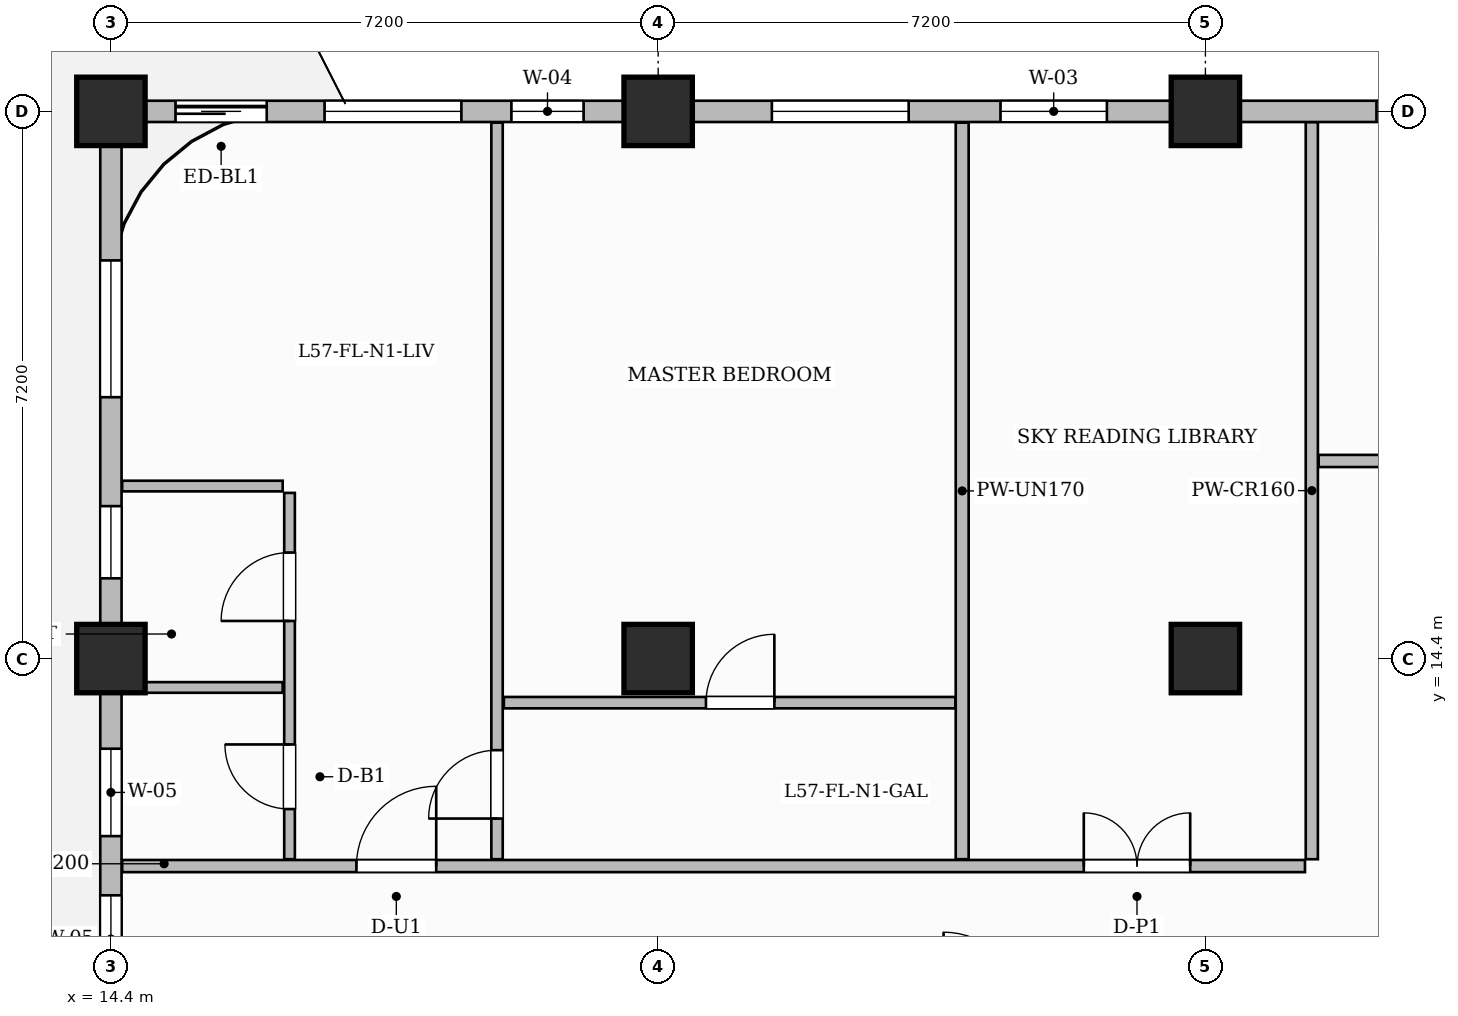
"""IFC4 building model, lengths in metres.
Left out: names, types, materials, properties, quantities, classifications, styles, units other than length and angle.
Written with IfcOpenShell. Run it as: python <this file> out.ifc"""

import sys

from ifc_helpers import new_model, si_unit, direction, frame, frame_2d, origin, origin_2d, place, context, subcontext, project, spatial, rectangle, extrude, source, transform, mapped, element, fill, save


model = new_model("IFC4")
c1 = context("Model", 3, precision=1e-05, world=origin(), true_north=direction((0.0, 1.0)))
c2 = subcontext(c1, "Body", "Model", "MODEL_VIEW")
j1 = project(units=[si_unit("LENGTHUNIT", "METRE"), si_unit("PLANEANGLEUNIT", "RADIAN")], contexts=[c1])
p1 = place(None, origin())
s1 = spatial("IfcSite", under=j1, at=p1, CompositionType="ELEMENT")
p2 = place(p1, origin())
s2 = spatial("IfcBuilding", under=s1, at=p2, CompositionType="ELEMENT")
p3 = place(p2, frame((0.0, 0.0, 228.85)))
s3 = spatial("IfcBuildingStorey", under=s2, at=p3, CompositionType="ELEMENT", Elevation=228.85)
m1 = source(origin(), c2, "Body", "SweptSolid", [
    extrude(rectangle(XDim=0.9, YDim=0.9, at=origin_2d()), origin(), (0.0, 0.0, 1.0), 3.85),
])
for number, where, z_axis, x_axis in (
    (1, (14.4, 14.4, 0.0), (0.0, 0.0, 1.0), (1.0, 0.0, 0.0)),
    (2, (14.4, 21.6, 0.0), (0.0, 0.0, 1.0), (1.0, 0.0, 0.0)),
    (3, (21.6, 14.4, 0.0), (0.0, 0.0, 1.0), (1.0, 0.0, 0.0)),
    (4, (21.6, 21.6, 0.0), (0.0, 0.0, 1.0), (1.0, 0.0, 0.0)),
    (5, (28.8, 14.4, 0.0), (0.0, 0.0, 1.0), (1.0, 0.0, 0.0)),
    (6, (28.8, 21.6, 0.0), (0.0, 0.0, 1.0), (1.0, 0.0, 0.0)),
):
    element("IfcColumn", number, at=place(p3, frame(where, z_axis=z_axis, x_axis=x_axis)), inside=s3, PredefinedType="COLUMN", context=c2, shape_type="MappedRepresentation", body=[
        mapped(m1, transform((0.0, 0.0, 0.0), scale=1.0)),
    ])
p4 = place(p3, frame((14.548, 11.67, 0.0), z_axis=(0.0, 0.0, 1.0), x_axis=(1.0, 0.0, 0.0)))
e7 = element("IfcWall", 7, at=p4, inside=s3, PredefinedType="PARTITIONING", context=c2, shape_type="SweptSolid", body=[
    extrude(rectangle(XDim=15.562, YDim=0.16, at=frame_2d((7.781, 0.0))), origin(), (0.0, 0.0, 1.0), 3.6),
])
p5 = place(p4, frame((3.082, 0.0, 0.0)))
e8 = element("IfcOpeningElement", 8, at=p5, cuts=e7, PredefinedType="OPENING", context=c2, shape_type="SweptSolid", body=[
    extrude(rectangle(XDim=1.05, YDim=2.25, at=frame_2d((0.525, 1.125))), frame((0.0, 0.09, 0.0), z_axis=(0.0, -1.0, 0.0), x_axis=(1.0, 0.0, 0.0)), (0.0, 0.0, 1.0), 0.18),
])
p6 = place(p4, frame((12.652, 0.0, 0.0)))
e9 = element("IfcOpeningElement", 9, at=p6, cuts=e7, PredefinedType="OPENING", context=c2, shape_type="SweptSolid", body=[
    extrude(rectangle(XDim=1.4, YDim=2.35, at=frame_2d((0.7, 1.175))), frame((0.0, 0.09, 0.0), z_axis=(0.0, -1.0, 0.0), x_axis=(1.0, 0.0, 0.0)), (0.0, 0.0, 1.0), 0.18),
])
p7 = place(p3, frame((30.2, 11.76, 0.0), z_axis=(0.0, 0.0, 1.0), x_axis=(0.0, 1.0, 0.0)))
e10 = element("IfcWall", 10, at=p7, inside=s3, PredefinedType="PARTITIONING", context=c2, shape_type="SweptSolid", body=[
    extrude(rectangle(XDim=9.7, YDim=0.16, at=frame_2d((4.85, 0.0))), origin(), (0.0, 0.0, 1.0), 3.6),
])
p8 = place(p3, frame((30.29, 17.0, 0.0), z_axis=(0.0, 0.0, 1.0), x_axis=(1.0, 0.0, 0.0)))
e11 = element("IfcWall", 11, at=p8, inside=s3, PredefinedType="PARTITIONING", context=c2, shape_type="SweptSolid", body=[
    extrude(rectangle(XDim=19.37, YDim=0.16, at=frame_2d((9.685, 0.0))), origin(), (0.0, 0.0, 1.0), 3.6),
])
p9 = place(p8, frame((1.235, 0.0, 0.0)))
e12 = element("IfcOpeningElement", 12, at=p9, cuts=e11, PredefinedType="OPENING", context=c2, shape_type="SweptSolid", body=[
    extrude(rectangle(XDim=0.85, YDim=2.1, at=frame_2d((0.425, 1.05))), frame((0.0, 0.09, 0.0), z_axis=(0.0, -1.0, 0.0), x_axis=(1.0, 0.0, 0.0)), (0.0, 0.0, 1.0), 0.18),
])
p10 = place(p8, frame((7.56, 0.0, 0.0)))
e13 = element("IfcOpeningElement", 13, at=p10, cuts=e11, PredefinedType="OPENING", context=c2, shape_type="SweptSolid", body=[
    extrude(rectangle(XDim=1.4, YDim=2.35, at=frame_2d((0.7, 1.175))), frame((0.0, 0.09, 0.0), z_axis=(0.0, -1.0, 0.0), x_axis=(1.0, 0.0, 0.0)), (0.0, 0.0, 1.0), 0.18),
])
p11 = place(p8, frame((15.785, 0.0, 0.0)))
e14 = element("IfcOpeningElement", 14, at=p11, cuts=e11, PredefinedType="OPENING", context=c2, shape_type="SweptSolid", body=[
    extrude(rectangle(XDim=0.95, YDim=2.15, at=frame_2d((0.475, 1.075))), frame((0.0, 0.09, 0.0), z_axis=(0.0, -1.0, 0.0), x_axis=(1.0, 0.0, 0.0)), (0.0, 0.0, 1.0), 0.18),
])
p12 = place(p3, frame((25.6, 11.76, 0.0), z_axis=(0.0, 0.0, 1.0), x_axis=(0.0, 1.0, 0.0)))
e15 = element("IfcWall", 15, at=p12, inside=s3, PredefinedType="PARTITIONING", context=c2, shape_type="SweptSolid", body=[
    extrude(rectangle(XDim=9.692, YDim=0.17, at=frame_2d((4.846, 0.0))), origin(), (0.0, 0.0, 1.0), 3.6),
])
p13 = place(p3, frame((16.75, 11.76, 0.0), z_axis=(0.0, 0.0, 1.0), x_axis=(0.0, 1.0, 0.0)))
e16 = element("IfcWall", 16, at=p13, inside=s3, PredefinedType="PARTITIONING", context=c2, shape_type="SweptSolid", body=[
    extrude(rectangle(XDim=4.82, YDim=0.14, at=frame_2d((2.41, 0.0))), origin(), (0.0, 0.0, 1.0), 3.6),
])
p14 = place(p13, frame((0.66, 0.0, 0.0)))
e17 = element("IfcOpeningElement", 17, at=p14, cuts=e16, PredefinedType="OPENING", context=c2, shape_type="SweptSolid", body=[
    extrude(rectangle(XDim=0.85, YDim=2.1, at=frame_2d((0.425, 1.05))), frame((0.0, 0.08, 0.0), z_axis=(0.0, -1.0, 0.0), x_axis=(1.0, 0.0, 0.0)), (0.0, 0.0, 1.0), 0.16),
])
p15 = place(p13, frame((3.135, 0.0, 0.0)))
e18 = element("IfcOpeningElement", 18, at=p15, cuts=e16, PredefinedType="OPENING", context=c2, shape_type="SweptSolid", body=[
    extrude(rectangle(XDim=0.9, YDim=2.15, at=frame_2d((0.45, 1.075))), frame((0.0, 0.08, 0.0), z_axis=(0.0, -1.0, 0.0), x_axis=(1.0, 0.0, 0.0)), (0.0, 0.0, 1.0), 0.16),
])
p16 = place(p3, frame((14.59, 14.02, 0.0), z_axis=(0.0, 0.0, 1.0), x_axis=(1.0, 0.0, 0.0)))
e19 = element("IfcWall", 19, at=p16, inside=s3, PredefinedType="PARTITIONING", context=c2, shape_type="SweptSolid", body=[
    extrude(rectangle(XDim=2.07, YDim=0.14, at=frame_2d((1.035, 0.0))), origin(), (0.0, 0.0, 1.0), 3.6),
])
p17 = place(p3, frame((14.548, 16.67, 0.0), z_axis=(0.0, 0.0, 1.0), x_axis=(1.0, 0.0, 0.0)))
e20 = element("IfcWall", 20, at=p17, inside=s3, PredefinedType="PARTITIONING", context=c2, shape_type="SweptSolid", body=[
    extrude(rectangle(XDim=2.112, YDim=0.14, at=frame_2d((1.056, 0.0))), origin(), (0.0, 0.0, 1.0), 3.6),
])
p18 = place(p3, frame((19.48, 11.76, 0.0), z_axis=(0.0, 0.0, 1.0), x_axis=(0.0, 1.0, 0.0)))
e21 = element("IfcWall", 21, at=p18, inside=s3, PredefinedType="PARTITIONING", context=c2, shape_type="SweptSolid", body=[
    extrude(rectangle(XDim=9.692, YDim=0.15, at=frame_2d((4.846, 0.0))), origin(), (0.0, 0.0, 1.0), 3.6),
])
p19 = place(p18, frame((0.535, 0.0, 0.0)))
e22 = element("IfcOpeningElement", 22, at=p19, cuts=e21, PredefinedType="OPENING", context=c2, shape_type="SweptSolid", body=[
    extrude(rectangle(XDim=0.9, YDim=2.15, at=frame_2d((0.45, 1.075))), frame((0.0, 0.085, 0.0), z_axis=(0.0, -1.0, 0.0), x_axis=(1.0, 0.0, 0.0)), (0.0, 0.0, 1.0), 0.17),
])
p20 = place(p3, frame((19.57, 13.82, 0.0), z_axis=(0.0, 0.0, 1.0), x_axis=(1.0, 0.0, 0.0)))
e23 = element("IfcWall", 23, at=p20, inside=s3, PredefinedType="PARTITIONING", context=c2, shape_type="SweptSolid", body=[
    extrude(rectangle(XDim=5.94, YDim=0.15, at=frame_2d((2.97, 0.0))), origin(), (0.0, 0.0, 1.0), 3.6),
])
p21 = place(p20, frame((2.659, 0.0, 0.0)))
e24 = element("IfcOpeningElement", 24, at=p21, cuts=e23, PredefinedType="OPENING", context=c2, shape_type="SweptSolid", body=[
    extrude(rectangle(XDim=0.9, YDim=2.15, at=frame_2d((0.45, 1.075))), frame((0.0, 0.085, 0.0), z_axis=(0.0, -1.0, 0.0), x_axis=(1.0, 0.0, 0.0)), (0.0, 0.0, 1.0), 0.17),
])
p22 = place(p3, frame((14.4, 21.6, 0.0), z_axis=(0.0, 0.0, 1.0), x_axis=(1.0, 0.0, 0.0)))
e25 = element("IfcWall", 25, at=p22, inside=s3, PredefinedType="SOLIDWALL", context=c2, shape_type="SweptSolid", body=[
    extrude(rectangle(XDim=35.4, YDim=0.28, at=frame_2d((17.7, 0.0))), origin(), (0.0, 0.0, 1.0), 3.135),
])
p23 = place(p22, frame((0.85, 0.0, 0.0)))
e26 = element("IfcOpeningElement", 26, at=p23, cuts=e25, PredefinedType="OPENING", context=c2, shape_type="SweptSolid", body=[
    extrude(rectangle(XDim=1.2, YDim=2.2, at=frame_2d((0.6, 1.1))), frame((0.0, 0.15, 0.0), z_axis=(0.0, -1.0, 0.0), x_axis=(1.0, 0.0, 0.0)), (0.0, 0.0, 1.0), 0.3),
])
p24 = place(p22, frame((2.811, 0.0, 0.8)))
e27 = element("IfcOpeningElement", 27, at=p24, cuts=e25, PredefinedType="OPENING", context=c2, shape_type="SweptSolid", body=[
    extrude(rectangle(XDim=1.8, YDim=1.85, at=frame_2d((0.9, 0.925))), frame((0.0, 0.15, 0.0), z_axis=(0.0, -1.0, 0.0), x_axis=(1.0, 0.0, 0.0)), (0.0, 0.0, 1.0), 0.3),
])
p25 = place(p22, frame((5.269, 0.0, 0.8)))
e28 = element("IfcOpeningElement", 28, at=p25, cuts=e25, PredefinedType="OPENING", context=c2, shape_type="SweptSolid", body=[
    extrude(rectangle(XDim=0.95, YDim=1.75, at=frame_2d((0.475, 0.875))), frame((0.0, 0.15, 0.0), z_axis=(0.0, -1.0, 0.0), x_axis=(1.0, 0.0, 0.0)), (0.0, 0.0, 1.0), 0.3),
])
p26 = place(p22, frame((8.696, 0.0, 0.8)))
e29 = element("IfcOpeningElement", 29, at=p26, cuts=e25, PredefinedType="OPENING", context=c2, shape_type="SweptSolid", body=[
    extrude(rectangle(XDim=1.8, YDim=1.85, at=frame_2d((0.9, 0.925))), frame((0.0, 0.15, 0.0), z_axis=(0.0, -1.0, 0.0), x_axis=(1.0, 0.0, 0.0)), (0.0, 0.0, 1.0), 0.3),
])
p27 = place(p22, frame((11.704, 0.0, 0.8)))
e30 = element("IfcOpeningElement", 30, at=p27, cuts=e25, PredefinedType="OPENING", context=c2, shape_type="SweptSolid", body=[
    extrude(rectangle(XDim=1.4, YDim=1.85, at=frame_2d((0.7, 0.925))), frame((0.0, 0.15, 0.0), z_axis=(0.0, -1.0, 0.0), x_axis=(1.0, 0.0, 0.0)), (0.0, 0.0, 1.0), 0.3),
])
p28 = place(p22, frame((16.651, 0.0, 0.8)))
e31 = element("IfcOpeningElement", 31, at=p28, cuts=e25, PredefinedType="OPENING", context=c2, shape_type="SweptSolid", body=[
    extrude(rectangle(XDim=1.8, YDim=1.85, at=frame_2d((0.9, 0.925))), frame((0.0, 0.15, 0.0), z_axis=(0.0, -1.0, 0.0), x_axis=(1.0, 0.0, 0.0)), (0.0, 0.0, 1.0), 0.3),
])
p29 = place(p22, frame((21.725, 0.0, 0.8)))
e32 = element("IfcOpeningElement", 32, at=p29, cuts=e25, PredefinedType="OPENING", context=c2, shape_type="SweptSolid", body=[
    extrude(rectangle(XDim=1.8, YDim=1.85, at=frame_2d((0.9, 0.925))), frame((0.0, 0.15, 0.0), z_axis=(0.0, -1.0, 0.0), x_axis=(1.0, 0.0, 0.0)), (0.0, 0.0, 1.0), 0.3),
])
p30 = place(p22, frame((24.475, 0.0, 0.8)))
e33 = element("IfcOpeningElement", 33, at=p30, cuts=e25, PredefinedType="OPENING", context=c2, shape_type="SweptSolid", body=[
    extrude(rectangle(XDim=1.8, YDim=1.85, at=frame_2d((0.9, 0.925))), frame((0.0, 0.15, 0.0), z_axis=(0.0, -1.0, 0.0), x_axis=(1.0, 0.0, 0.0)), (0.0, 0.0, 1.0), 0.3),
])
p31 = place(p22, frame((29.531, 0.0, 0.8)))
e34 = element("IfcOpeningElement", 34, at=p31, cuts=e25, PredefinedType="OPENING", context=c2, shape_type="SweptSolid", body=[
    extrude(rectangle(XDim=1.8, YDim=1.85, at=frame_2d((0.9, 0.925))), frame((0.0, 0.15, 0.0), z_axis=(0.0, -1.0, 0.0), x_axis=(1.0, 0.0, 0.0)), (0.0, 0.0, 1.0), 0.3),
])
p32 = place(p22, frame((32.277, 0.0, 0.8)))
e35 = element("IfcOpeningElement", 35, at=p32, cuts=e25, PredefinedType="OPENING", context=c2, shape_type="SweptSolid", body=[
    extrude(rectangle(XDim=1.8, YDim=1.85, at=frame_2d((0.9, 0.925))), frame((0.0, 0.15, 0.0), z_axis=(0.0, -1.0, 0.0), x_axis=(1.0, 0.0, 0.0)), (0.0, 0.0, 1.0), 0.3),
])
p33 = place(p3, frame((14.4, 0.05, 0.0), z_axis=(0.0, 0.0, 1.0), x_axis=(0.0, 1.0, 0.0)))
e36 = element("IfcWall", 36, at=p33, inside=s3, PredefinedType="SOLIDWALL", context=c2, shape_type="SweptSolid", body=[
    extrude(rectangle(XDim=21.5, YDim=0.28, at=frame_2d((10.75, 0.0))), origin(), (0.0, 0.0, 1.0), 3.135),
])
p34 = place(p33, frame((1.275, 0.0, 0.8)))
e37 = element("IfcOpeningElement", 37, at=p34, cuts=e36, PredefinedType="OPENING", context=c2, shape_type="SweptSolid", body=[
    extrude(rectangle(XDim=1.8, YDim=1.85, at=frame_2d((0.9, 0.925))), frame((0.0, 0.15, 0.0), z_axis=(0.0, -1.0, 0.0), x_axis=(1.0, 0.0, 0.0)), (0.0, 0.0, 1.0), 0.3),
])
p35 = place(p33, frame((4.025, 0.0, 0.8)))
e38 = element("IfcOpeningElement", 38, at=p35, cuts=e36, PredefinedType="OPENING", context=c2, shape_type="SweptSolid", body=[
    extrude(rectangle(XDim=1.8, YDim=1.85, at=frame_2d((0.9, 0.925))), frame((0.0, 0.15, 0.0), z_axis=(0.0, -1.0, 0.0), x_axis=(1.0, 0.0, 0.0)), (0.0, 0.0, 1.0), 0.3),
])
p36 = place(p33, frame((8.246, 0.0, 0.8)))
e39 = element("IfcOpeningElement", 39, at=p36, cuts=e36, PredefinedType="OPENING", context=c2, shape_type="SweptSolid", body=[
    extrude(rectangle(XDim=1.15, YDim=1.8, at=frame_2d((0.575, 0.9))), frame((0.0, 0.15, 0.0), z_axis=(0.0, -1.0, 0.0), x_axis=(1.0, 0.0, 0.0)), (0.0, 0.0, 1.0), 0.3),
])
p37 = place(p33, frame((10.085, 0.0, 0.8)))
e40 = element("IfcOpeningElement", 40, at=p37, cuts=e36, PredefinedType="OPENING", context=c2, shape_type="SweptSolid", body=[
    extrude(rectangle(XDim=1.15, YDim=1.8, at=frame_2d((0.575, 0.9))), frame((0.0, 0.15, 0.0), z_axis=(0.0, -1.0, 0.0), x_axis=(1.0, 0.0, 0.0)), (0.0, 0.0, 1.0), 0.3),
])
p38 = place(p33, frame((12.014, 0.0, 0.8)))
e41 = element("IfcOpeningElement", 41, at=p38, cuts=e36, PredefinedType="OPENING", context=c2, shape_type="SweptSolid", body=[
    extrude(rectangle(XDim=1.15, YDim=1.8, at=frame_2d((0.575, 0.9))), frame((0.0, 0.15, 0.0), z_axis=(0.0, -1.0, 0.0), x_axis=(1.0, 0.0, 0.0)), (0.0, 0.0, 1.0), 0.3),
])
p39 = place(p33, frame((15.406, 0.0, 0.8)))
e42 = element("IfcOpeningElement", 42, at=p39, cuts=e36, PredefinedType="OPENING", context=c2, shape_type="SweptSolid", body=[
    extrude(rectangle(XDim=0.95, YDim=1.75, at=frame_2d((0.475, 0.875))), frame((0.0, 0.15, 0.0), z_axis=(0.0, -1.0, 0.0), x_axis=(1.0, 0.0, 0.0)), (0.0, 0.0, 1.0), 0.3),
])
p40 = place(p33, frame((17.789, 0.0, 0.8)))
e43 = element("IfcOpeningElement", 43, at=p40, cuts=e36, PredefinedType="OPENING", context=c2, shape_type="SweptSolid", body=[
    extrude(rectangle(XDim=1.8, YDim=1.85, at=frame_2d((0.9, 0.925))), frame((0.0, 0.15, 0.0), z_axis=(0.0, -1.0, 0.0), x_axis=(1.0, 0.0, 0.0)), (0.0, 0.0, 1.0), 0.3),
])
m2 = source(origin(), c2, "Body", "SweptSolid", [
    extrude(rectangle(XDim=0.85, YDim=2.1, at=frame_2d((0.425, 1.05))), frame((0.0, 0.025, 0.0), z_axis=(0.0, -1.0, 0.0), x_axis=(1.0, 0.0, 0.0)), (0.0, 0.0, 1.0), 0.05),
])
p41 = place(p14, origin())
e44 = element("IfcDoor", 44, at=p41, inside=s3, OperationType="SINGLE_SWING_RIGHT", PredefinedType="DOOR", context=c2, shape_type="MappedRepresentation", body=[
    mapped(m2, transform((0.0, 0.0, 0.0), scale=1.0)),
])
fill(e17, e44)
m3 = source(origin(), c2, "Body", "SweptSolid", [
    extrude(rectangle(XDim=0.9, YDim=2.15, at=frame_2d((0.45, 1.075))), frame((0.0, 0.025, 0.0), z_axis=(0.0, -1.0, 0.0), x_axis=(1.0, 0.0, 0.0)), (0.0, 0.0, 1.0), 0.05),
])
p42 = place(p15, origin())
e45 = element("IfcDoor", 45, at=p42, inside=s3, OperationType="SINGLE_SWING_LEFT", PredefinedType="DOOR", context=c2, shape_type="MappedRepresentation", body=[
    mapped(m3, transform((0.0, 0.0, 0.0), scale=1.0)),
])
fill(e18, e45)
m4 = source(origin(), c2, "Body", "SweptSolid", [
    extrude(rectangle(XDim=1.05, YDim=2.25, at=frame_2d((0.525, 1.125))), frame((0.0, 0.025, 0.0), z_axis=(0.0, -1.0, 0.0), x_axis=(1.0, 0.0, 0.0)), (0.0, 0.0, 1.0), 0.05),
])
p43 = place(p5, origin())
e46 = element("IfcDoor", 46, at=p43, inside=s3, OperationType="SINGLE_SWING_RIGHT", PredefinedType="DOOR", context=c2, shape_type="MappedRepresentation", body=[
    mapped(m4, transform((0.0, 0.0, 0.0), scale=1.0)),
])
fill(e8, e46)
p44 = place(p19, origin())
e47 = element("IfcDoor", 47, at=p44, inside=s3, OperationType="SINGLE_SWING_LEFT", PredefinedType="DOOR", context=c2, shape_type="MappedRepresentation", body=[
    mapped(m3, transform((0.0, 0.0, 0.0), scale=1.0)),
])
fill(e22, e47)
p45 = place(p21, origin())
e48 = element("IfcDoor", 48, at=p45, inside=s3, OperationType="SINGLE_SWING_RIGHT", PredefinedType="DOOR", context=c2, shape_type="MappedRepresentation", body=[
    mapped(m3, transform((0.0, 0.0, 0.0), scale=1.0)),
])
fill(e24, e48)
m5 = source(origin(), c2, "Body", "SweptSolid", [
    extrude(rectangle(XDim=1.4, YDim=2.35, at=frame_2d((0.7, 1.175))), frame((0.0, 0.025, 0.0), z_axis=(0.0, -1.0, 0.0), x_axis=(1.0, 0.0, 0.0)), (0.0, 0.0, 1.0), 0.05),
])
p46 = place(p6, origin())
e49 = element("IfcDoor", 49, at=p46, inside=s3, OperationType="DOUBLE_DOOR_SINGLE_SWING", PredefinedType="DOOR", context=c2, shape_type="MappedRepresentation", body=[
    mapped(m5, transform((0.0, 0.0, 0.0), scale=1.0)),
])
fill(e9, e49)
m6 = source(origin(), c2, "Body", "SweptSolid", [
    extrude(rectangle(XDim=1.2, YDim=2.2, at=frame_2d((0.6, 1.1))), frame((0.0, 0.025, 0.0), z_axis=(0.0, -1.0, 0.0), x_axis=(1.0, 0.0, 0.0)), (0.0, 0.0, 1.0), 0.05),
])
p47 = place(p23, origin())
e50 = element("IfcDoor", 50, at=p47, inside=s3, OperationType="SLIDING_TO_LEFT", PredefinedType="DOOR", context=c2, shape_type="MappedRepresentation", body=[
    mapped(m6, transform((0.0, 0.0, 0.0), scale=1.0)),
])
fill(e26, e50)
m7 = source(origin(), c2, "Body", "SweptSolid", [
    extrude(rectangle(XDim=1.8, YDim=1.85, at=frame_2d((0.9, 0.925))), frame((0.0, 0.03, 0.0), z_axis=(0.0, -1.0, 0.0), x_axis=(1.0, 0.0, 0.0)), (0.0, 0.0, 1.0), 0.06),
])
p48 = place(p24, origin())
e51 = element("IfcWindow", 51, at=p48, inside=s3, PartitioningType="DOUBLE_PANEL_VERTICAL", PredefinedType="WINDOW", context=c2, shape_type="MappedRepresentation", body=[
    mapped(m7, transform((0.0, 0.0, 0.0), scale=1.0)),
])
fill(e27, e51)
m8 = source(origin(), c2, "Body", "SweptSolid", [
    extrude(rectangle(XDim=0.95, YDim=1.75, at=frame_2d((0.475, 0.875))), frame((0.0, 0.03, 0.0), z_axis=(0.0, -1.0, 0.0), x_axis=(1.0, 0.0, 0.0)), (0.0, 0.0, 1.0), 0.06),
])
p49 = place(p25, origin())
e52 = element("IfcWindow", 52, at=p49, inside=s3, PartitioningType="SINGLE_PANEL", PredefinedType="WINDOW", context=c2, shape_type="MappedRepresentation", body=[
    mapped(m8, transform((0.0, 0.0, 0.0), scale=1.0)),
])
fill(e28, e52)
p50 = place(p26, origin())
e53 = element("IfcWindow", 53, at=p50, inside=s3, PartitioningType="DOUBLE_PANEL_VERTICAL", PredefinedType="WINDOW", context=c2, shape_type="MappedRepresentation", body=[
    mapped(m7, transform((0.0, 0.0, 0.0), scale=1.0)),
])
fill(e29, e53)
m9 = source(origin(), c2, "Body", "SweptSolid", [
    extrude(rectangle(XDim=1.4, YDim=1.85, at=frame_2d((0.7, 0.925))), frame((0.0, 0.03, 0.0), z_axis=(0.0, -1.0, 0.0), x_axis=(1.0, 0.0, 0.0)), (0.0, 0.0, 1.0), 0.06),
])
p51 = place(p27, origin())
e54 = element("IfcWindow", 54, at=p51, inside=s3, PartitioningType="SINGLE_PANEL", PredefinedType="WINDOW", context=c2, shape_type="MappedRepresentation", body=[
    mapped(m9, transform((0.0, 0.0, 0.0), scale=1.0)),
])
fill(e30, e54)
p52 = place(p28, origin())
e55 = element("IfcWindow", 55, at=p52, inside=s3, PartitioningType="DOUBLE_PANEL_VERTICAL", PredefinedType="WINDOW", context=c2, shape_type="MappedRepresentation", body=[
    mapped(m7, transform((0.0, 0.0, 0.0), scale=1.0)),
])
fill(e31, e55)
m10 = source(origin(), c2, "Body", "SweptSolid", [
    extrude(rectangle(XDim=1.15, YDim=1.8, at=frame_2d((0.575, 0.9))), frame((0.0, 0.03, 0.0), z_axis=(0.0, -1.0, 0.0), x_axis=(1.0, 0.0, 0.0)), (0.0, 0.0, 1.0), 0.06),
])
p53 = place(p37, origin())
e56 = element("IfcWindow", 56, at=p53, inside=s3, PartitioningType="SINGLE_PANEL", PredefinedType="WINDOW", context=c2, shape_type="MappedRepresentation", body=[
    mapped(m10, transform((0.0, 0.0, 0.0), scale=1.0)),
])
fill(e40, e56)
p54 = place(p38, origin())
e57 = element("IfcWindow", 57, at=p54, inside=s3, PartitioningType="SINGLE_PANEL", PredefinedType="WINDOW", context=c2, shape_type="MappedRepresentation", body=[
    mapped(m10, transform((0.0, 0.0, 0.0), scale=1.0)),
])
fill(e41, e57)
p55 = place(p39, origin())
e58 = element("IfcWindow", 58, at=p55, inside=s3, PartitioningType="SINGLE_PANEL", PredefinedType="WINDOW", context=c2, shape_type="MappedRepresentation", body=[
    mapped(m8, transform((0.0, 0.0, 0.0), scale=1.0)),
])
fill(e42, e58)
p56 = place(p40, origin())
e59 = element("IfcWindow", 59, at=p56, inside=s3, PartitioningType="DOUBLE_PANEL_VERTICAL", PredefinedType="WINDOW", context=c2, shape_type="MappedRepresentation", body=[
    mapped(m7, transform((0.0, 0.0, 0.0), scale=1.0)),
])
fill(e43, e59)
save(model, sys.argv[1])
